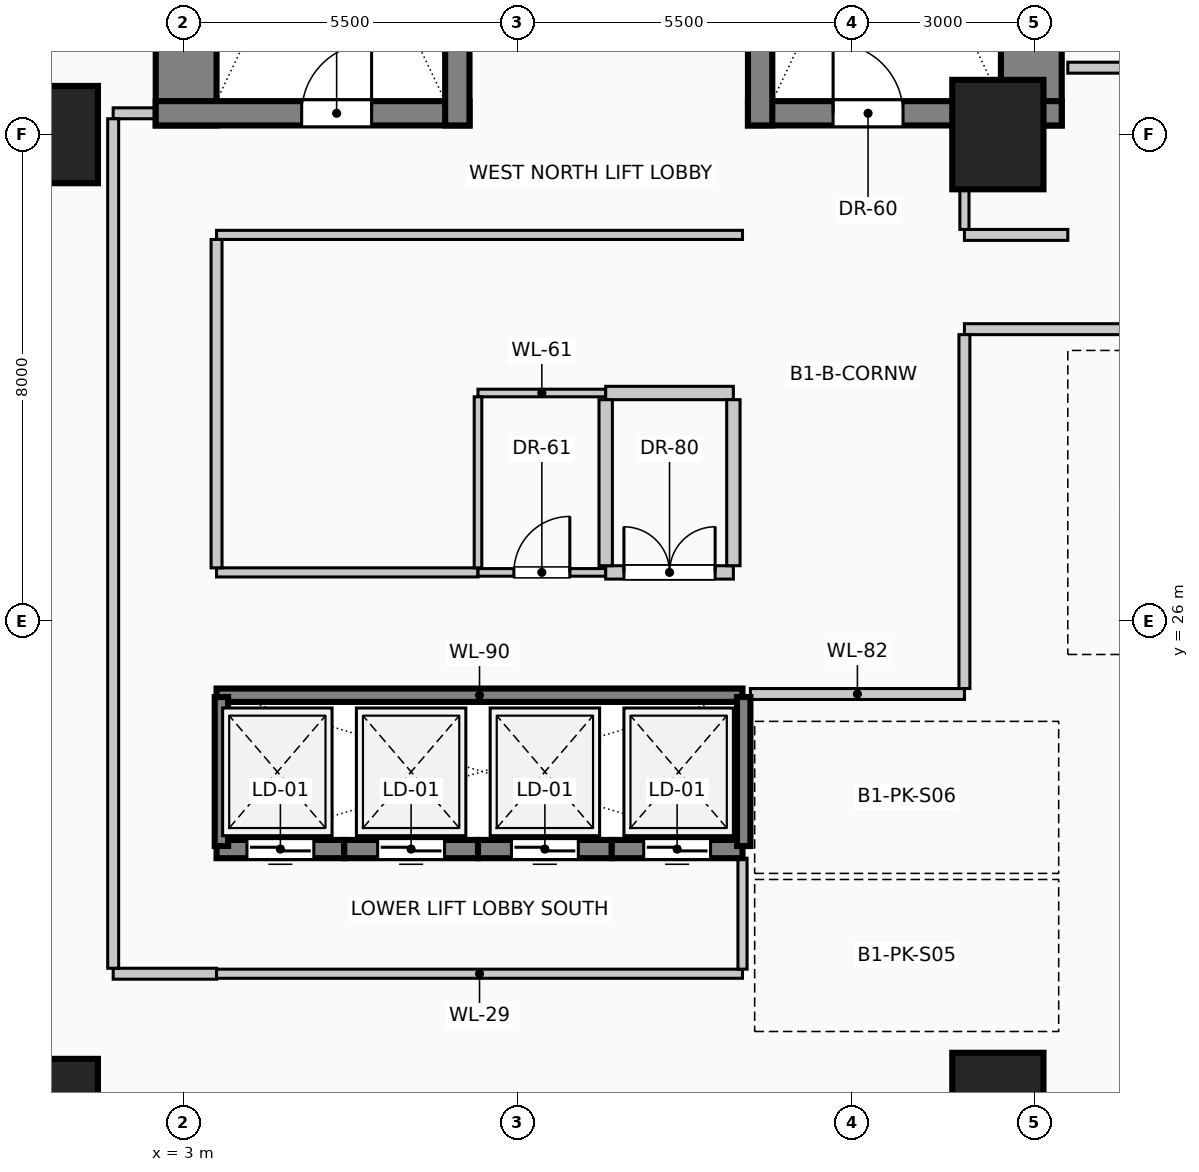
"""IFC4 building model, lengths in metres.
Left out: names, types, materials, properties, quantities, classifications, styles, units other than length and angle.
Written with IfcOpenShell. Run it as: python <this file> out.ifc"""

import sys

from ifc_helpers import new_model, si_unit, direction, frame, frame_2d, origin, origin_2d, place, context, subcontext, project, spatial, rectangle, extrude, element, fill, save


model = new_model("IFC4")
c1 = context("Model", 3, precision=1e-05, world=origin(), true_north=direction((0.0, 1.0)))
c2 = subcontext(c1, "Body", "Model", "MODEL_VIEW")
j1 = project(units=[si_unit("LENGTHUNIT", "METRE"), si_unit("PLANEANGLEUNIT", "RADIAN")], contexts=[c1])
p1 = place(None, origin())
s1 = spatial("IfcSite", under=j1, at=p1, CompositionType="ELEMENT")
p2 = place(p1, origin())
s2 = spatial("IfcBuilding", under=s1, at=p2, CompositionType="ELEMENT")
p3 = place(p2, frame((0.0, 0.0, -4.5)))
s3 = spatial("IfcBuildingStorey", under=s2, at=p3, CompositionType="ELEMENT", Elevation=-4.5)
for number, where, z_axis, x_axis in (
    (1, (3.05, 34.15, 0.0), (0.0, 0.0, 1.0), (0.0, 1.0, 0.0)),
    (2, (16.95, 34.15, 0.0), (0.0, 0.0, 1.0), (0.0, 1.0, 0.0)),
):
    element("IfcWall", number, at=place(p3, frame(where, z_axis=z_axis, x_axis=x_axis)), inside=s3, PredefinedType="SHEAR", context=c2, shape_type="SweptSolid", body=[
        extrude(rectangle(XDim=9.28, YDim=1.0, at=frame_2d((4.64, 0.0))), origin(), (0.0, 0.0, 1.0), 4.5),
    ])
p4 = place(p3, frame((2.55, 34.35, 0.0), z_axis=(0.0, 0.0, 1.0), x_axis=(1.0, 0.0, 0.0)))
e3 = element("IfcWall", 3, at=p4, inside=s3, PredefinedType="SHEAR", context=c2, shape_type="SweptSolid", body=[
    extrude(rectangle(XDim=5.16, YDim=0.4, at=frame_2d((2.58, 0.0))), origin(), (0.0, 0.0, 1.0), 4.5),
])
p5 = place(p4, frame((2.4, 0.0, 0.0)))
e4 = element("IfcOpeningElement", 4, at=p5, cuts=e3, PredefinedType="OPENING", context=c2, shape_type="SweptSolid", body=[
    extrude(rectangle(XDim=1.15, YDim=2.2, at=frame_2d((0.575, 1.1))), frame((0.0, 0.21, 0.0), z_axis=(0.0, -1.0, 0.0), x_axis=(1.0, 0.0, 0.0)), (0.0, 0.0, 1.0), 0.42),
])
p6 = place(p3, frame((12.29, 34.35, 0.0), z_axis=(0.0, 0.0, 1.0), x_axis=(1.0, 0.0, 0.0)))
e5 = element("IfcWall", 5, at=p6, inside=s3, PredefinedType="SHEAR", context=c2, shape_type="SweptSolid", body=[
    extrude(rectangle(XDim=5.16, YDim=0.4, at=frame_2d((2.58, 0.0))), origin(), (0.0, 0.0, 1.0), 4.5),
])
p7 = place(p6, frame((1.4, 0.0, 0.0)))
e6 = element("IfcOpeningElement", 6, at=p7, cuts=e5, PredefinedType="OPENING", context=c2, shape_type="SweptSolid", body=[
    extrude(rectangle(XDim=1.15, YDim=2.2, at=frame_2d((0.575, 1.1))), frame((0.0, 0.21, 0.0), z_axis=(0.0, -1.0, 0.0), x_axis=(1.0, 0.0, 0.0)), (0.0, 0.0, 1.0), 0.42),
])
for number, where, z_axis, x_axis in (
    (7, (7.51, 34.15, 0.0), (0.0, 0.0, 1.0), (0.0, 1.0, 0.0)),
    (8, (12.49, 34.15, 0.0), (0.0, 0.0, 1.0), (0.0, 1.0, 0.0)),
):
    element("IfcWall", number, at=place(p3, frame(where, z_axis=z_axis, x_axis=x_axis)), inside=s3, PredefinedType="SHEAR", context=c2, shape_type="SweptSolid", body=[
        extrude(rectangle(XDim=9.28, YDim=0.4, at=frame_2d((4.64, 0.0))), origin(), (0.0, 0.0, 1.0), 4.5),
    ])
for number, where, z_axis, x_axis in (
    (9, (0.6, 18.0, 0.0), (0.0, 0.0, 1.0), (0.0, 1.0, 0.0)),
    (10, (0.6, 34.0, 0.0), (0.0, 0.0, 1.0), (0.0, 1.0, 0.0)),
):
    element("IfcColumn", number, at=place(p3, frame(where, z_axis=z_axis, x_axis=x_axis)), inside=s3, PredefinedType="COLUMN", context=c2, shape_type="SweptSolid", body=[
        extrude(rectangle(XDim=1.6, YDim=2.0, at=origin_2d()), origin(), (0.0, 0.0, 1.0), 4.5),
    ])
for number, where, z_axis, x_axis in (
    (11, (16.4, 18.0, 0.0), (0.0, 0.0, 1.0), (1.0, 0.0, 0.0)),
    (12, (16.4, 34.0, 0.0), (0.0, 0.0, 1.0), (1.0, 0.0, 0.0)),
):
    element("IfcColumn", number, at=place(p3, frame(where, z_axis=z_axis, x_axis=x_axis)), inside=s3, PredefinedType="COLUMN", context=c2, shape_type="SweptSolid", body=[
        extrude(rectangle(XDim=1.5, YDim=1.8, at=origin_2d()), origin(), (0.0, 0.0, 1.0), 4.5),
    ])
p8 = place(p3, frame((5.65, 22.25, 0.0), z_axis=(0.0, 0.0, 1.0), x_axis=(-1.0, 0.0, 0.0)))
e13 = element("IfcWall", 13, at=p8, inside=s3, PredefinedType="SOLIDWALL", context=c2, shape_type="SweptSolid", body=[
    extrude(rectangle(XDim=2.1, YDim=0.3, at=frame_2d((1.05, 0.0))), origin(), (0.0, 0.0, 1.0), 4.5),
])
p9 = place(p8, frame((0.5, 0.0, 0.0)))
e14 = element("IfcOpeningElement", 14, at=p9, cuts=e13, PredefinedType="OPENING", context=c2, shape_type="SweptSolid", body=[
    extrude(rectangle(XDim=1.1, YDim=2.2, at=frame_2d((0.55, 1.1))), frame((0.0, 0.16, 0.0), z_axis=(0.0, -1.0, 0.0), x_axis=(1.0, 0.0, 0.0)), (0.0, 0.0, 1.0), 0.32),
])
p10 = place(p3, frame((7.85, 22.25, 0.0), z_axis=(0.0, 0.0, 1.0), x_axis=(-1.0, 0.0, 0.0)))
e15 = element("IfcWall", 15, at=p10, inside=s3, PredefinedType="SOLIDWALL", context=c2, shape_type="SweptSolid", body=[
    extrude(rectangle(XDim=2.2, YDim=0.3, at=frame_2d((1.1, 0.0))), origin(), (0.0, 0.0, 1.0), 4.5),
])
p11 = place(p10, frame((0.55, 0.0, 0.0)))
e16 = element("IfcOpeningElement", 16, at=p11, cuts=e15, PredefinedType="OPENING", context=c2, shape_type="SweptSolid", body=[
    extrude(rectangle(XDim=1.1, YDim=2.2, at=frame_2d((0.55, 1.1))), frame((0.0, 0.16, 0.0), z_axis=(0.0, -1.0, 0.0), x_axis=(1.0, 0.0, 0.0)), (0.0, 0.0, 1.0), 0.32),
])
p12 = place(p3, frame((10.05, 22.25, 0.0), z_axis=(0.0, 0.0, 1.0), x_axis=(-1.0, 0.0, 0.0)))
e17 = element("IfcWall", 17, at=p12, inside=s3, PredefinedType="SOLIDWALL", context=c2, shape_type="SweptSolid", body=[
    extrude(rectangle(XDim=2.2, YDim=0.3, at=frame_2d((1.1, 0.0))), origin(), (0.0, 0.0, 1.0), 4.5),
])
p13 = place(p12, frame((0.55, 0.0, 0.0)))
e18 = element("IfcOpeningElement", 18, at=p13, cuts=e17, PredefinedType="OPENING", context=c2, shape_type="SweptSolid", body=[
    extrude(rectangle(XDim=1.1, YDim=2.2, at=frame_2d((0.55, 1.1))), frame((0.0, 0.16, 0.0), z_axis=(0.0, -1.0, 0.0), x_axis=(1.0, 0.0, 0.0)), (0.0, 0.0, 1.0), 0.32),
])
p14 = place(p3, frame((12.2, 22.25, 0.0), z_axis=(0.0, 0.0, 1.0), x_axis=(-1.0, 0.0, 0.0)))
e19 = element("IfcWall", 19, at=p14, inside=s3, PredefinedType="SOLIDWALL", context=c2, shape_type="SweptSolid", body=[
    extrude(rectangle(XDim=2.15, YDim=0.3, at=frame_2d((1.075, 0.0))), origin(), (0.0, 0.0, 1.0), 4.5),
])
p15 = place(p14, frame((0.525, 0.0, 0.0)))
e20 = element("IfcOpeningElement", 20, at=p15, cuts=e19, PredefinedType="OPENING", context=c2, shape_type="SweptSolid", body=[
    extrude(rectangle(XDim=1.1, YDim=2.2, at=frame_2d((0.55, 1.1))), frame((0.0, 0.16, 0.0), z_axis=(0.0, -1.0, 0.0), x_axis=(1.0, 0.0, 0.0)), (0.0, 0.0, 1.0), 0.32),
])
p16 = place(p3, frame((3.55, 24.78, 0.0), z_axis=(0.0, 0.0, 1.0), x_axis=(1.0, 0.0, 0.0)))
e21 = element("IfcWall", 21, at=p16, inside=s3, PredefinedType="SOLIDWALL", context=c2, shape_type="SweptSolid", body=[
    extrude(rectangle(XDim=8.65, YDim=0.22, at=frame_2d((4.325, 0.0))), origin(), (0.0, 0.0, 1.0), 4.5),
])
for number, where, z_axis, x_axis in (
    (22, (3.63, 22.3, 0.0), (0.0, 0.0, 1.0), (0.0, 1.0, 0.0)),
    (23, (12.22, 22.3, 0.0), (0.0, 0.0, 1.0), (0.0, 1.0, 0.0)),
):
    element("IfcWall", number, at=place(p3, frame(where, z_axis=z_axis, x_axis=x_axis)), inside=s3, PredefinedType="SOLIDWALL", context=c2, shape_type="SweptSolid", body=[
        extrude(rectangle(XDim=2.45, YDim=0.22, at=frame_2d((1.225, 0.0))), origin(), (0.0, 0.0, 1.0), 4.5),
    ])
p17 = place(p3, frame((1.85, 20.2, 0.0), z_axis=(0.0, 0.0, 1.0), x_axis=(1.0, 0.0, 0.0)))
e24 = element("IfcWall", 24, at=p17, inside=s3, PredefinedType="PARTITIONING", context=c2, shape_type="SweptSolid", body=[
    extrude(rectangle(XDim=1.7, YDim=0.18, at=frame_2d((0.85, 0.0))), origin(), (0.0, 0.0, 1.0), 4.1),
])
p18 = place(p3, frame((3.55, 20.2, 0.0), z_axis=(0.0, 0.0, 1.0), x_axis=(1.0, 0.0, 0.0)))
e25 = element("IfcWall", 25, at=p18, inside=s3, PredefinedType="PARTITIONING", context=c2, shape_type="SweptSolid", body=[
    extrude(rectangle(XDim=8.65, YDim=0.15, at=frame_2d((4.325, 0.0))), origin(), (0.0, 0.0, 1.0), 4.1),
])
p19 = place(p3, frame((12.33, 24.8, 0.0), z_axis=(0.0, 0.0, 1.0), x_axis=(1.0, 0.0, 0.0)))
e26 = element("IfcWall", 26, at=p19, inside=s3, PredefinedType="PARTITIONING", context=c2, shape_type="SweptSolid", body=[
    extrude(rectangle(XDim=3.52, YDim=0.18, at=frame_2d((1.76, 0.0))), origin(), (0.0, 0.0, 1.0), 4.1),
])
p20 = place(p3, frame((3.55, 26.8, 0.0), z_axis=(0.0, 0.0, 1.0), x_axis=(1.0, 0.0, 0.0)))
e27 = element("IfcWall", 27, at=p20, inside=s3, PredefinedType="PARTITIONING", context=c2, shape_type="SweptSolid", body=[
    extrude(rectangle(XDim=4.3, YDim=0.15, at=frame_2d((2.15, 0.0))), origin(), (0.0, 0.0, 1.0), 4.1),
])
p21 = place(p3, frame((7.85, 26.8, 0.0), z_axis=(0.0, 0.0, 1.0), x_axis=(1.0, 0.0, 0.0)))
e28 = element("IfcWall", 28, at=p21, inside=s3, PredefinedType="PARTITIONING", context=c2, shape_type="SweptSolid", body=[
    extrude(rectangle(XDim=2.1, YDim=0.125, at=frame_2d((1.05, 0.0))), origin(), (0.0, 0.0, 1.0), 4.1),
])
p22 = place(p21, frame((0.59, 0.0, 0.0)))
e29 = element("IfcOpeningElement", 29, at=p22, cuts=e28, PredefinedType="OPENING", context=c2, shape_type="SweptSolid", body=[
    extrude(rectangle(XDim=0.92, YDim=2.1, at=frame_2d((0.46, 1.05))), frame((0.0, 0.073, 0.0), z_axis=(0.0, -1.0, 0.0), x_axis=(1.0, 0.0, 0.0)), (0.0, 0.0, 1.0), 0.145),
])
p23 = place(p3, frame((9.95, 26.8, 0.0), z_axis=(0.0, 0.0, 1.0), x_axis=(1.0, 0.0, 0.0)))
e30 = element("IfcWall", 30, at=p23, inside=s3, PredefinedType="PARTITIONING", context=c2, shape_type="SweptSolid", body=[
    extrude(rectangle(XDim=2.1, YDim=0.22, at=frame_2d((1.05, 0.0))), origin(), (0.0, 0.0, 1.0), 4.1),
])
p24 = place(p23, frame((0.3, 0.0, 0.0)))
e31 = element("IfcOpeningElement", 31, at=p24, cuts=e30, PredefinedType="OPENING", context=c2, shape_type="SweptSolid", body=[
    extrude(rectangle(XDim=1.5, YDim=2.25, at=frame_2d((0.75, 1.125))), frame((0.0, 0.12, 0.0), z_axis=(0.0, -1.0, 0.0), x_axis=(1.0, 0.0, 0.0)), (0.0, 0.0, 1.0), 0.24),
])
p25 = place(p3, frame((7.85, 29.75, 0.0), z_axis=(0.0, 0.0, 1.0), x_axis=(1.0, 0.0, 0.0)))
e32 = element("IfcWall", 32, at=p25, inside=s3, PredefinedType="PARTITIONING", context=c2, shape_type="SweptSolid", body=[
    extrude(rectangle(XDim=2.1, YDim=0.125, at=frame_2d((1.05, 0.0))), origin(), (0.0, 0.0, 1.0), 4.1),
])
p26 = place(p3, frame((9.95, 29.75, 0.0), z_axis=(0.0, 0.0, 1.0), x_axis=(1.0, 0.0, 0.0)))
e33 = element("IfcWall", 33, at=p26, inside=s3, PredefinedType="PARTITIONING", context=c2, shape_type="SweptSolid", body=[
    extrude(rectangle(XDim=2.1, YDim=0.22, at=frame_2d((1.05, 0.0))), origin(), (0.0, 0.0, 1.0), 4.1),
])
p27 = place(p3, frame((15.85, 30.8, 0.0), z_axis=(0.0, 0.0, 1.0), x_axis=(1.0, 0.0, 0.0)))
e34 = element("IfcWall", 34, at=p27, inside=s3, PredefinedType="PARTITIONING", context=c2, shape_type="SweptSolid", body=[
    extrude(rectangle(XDim=29.7, YDim=0.18, at=frame_2d((14.85, 0.0))), origin(), (0.0, 0.0, 1.0), 4.1),
])
p28 = place(p3, frame((3.55, 32.35, 0.0), z_axis=(0.0, 0.0, 1.0), x_axis=(1.0, 0.0, 0.0)))
e35 = element("IfcWall", 35, at=p28, inside=s3, PredefinedType="PARTITIONING", context=c2, shape_type="SweptSolid", body=[
    extrude(rectangle(XDim=8.65, YDim=0.15, at=frame_2d((4.325, 0.0))), origin(), (0.0, 0.0, 1.0), 4.1),
])
p29 = place(p3, frame((15.85, 32.35, 0.0), z_axis=(0.0, 0.0, 1.0), x_axis=(1.0, 0.0, 0.0)))
e36 = element("IfcWall", 36, at=p29, inside=s3, PredefinedType="PARTITIONING", context=c2, shape_type="SweptSolid", body=[
    extrude(rectangle(XDim=1.7, YDim=0.18, at=frame_2d((0.85, 0.0))), origin(), (0.0, 0.0, 1.0), 4.1),
])
p30 = place(p3, frame((1.85, 34.35, 0.0), z_axis=(0.0, 0.0, 1.0), x_axis=(1.0, 0.0, 0.0)))
e37 = element("IfcWall", 37, at=p30, inside=s3, PredefinedType="PARTITIONING", context=c2, shape_type="SweptSolid", body=[
    extrude(rectangle(XDim=0.7, YDim=0.18, at=frame_2d((0.35, 0.0))), origin(), (0.0, 0.0, 1.0), 3.145),
])
p31 = place(p3, frame((17.55, 35.1, 0.0), z_axis=(0.0, 0.0, 1.0), x_axis=(1.0, 0.0, 0.0)))
e38 = element("IfcWall", 38, at=p31, inside=s3, PredefinedType="PARTITIONING", context=c2, shape_type="SweptSolid", body=[
    extrude(rectangle(XDim=10.25, YDim=0.18, at=frame_2d((5.125, 0.0))), origin(), (0.0, 0.0, 1.0), 4.1),
])
p32 = place(p31, frame((4.685, 0.0, 0.0)))
e39 = element("IfcOpeningElement", 39, at=p32, cuts=e38, PredefinedType="OPENING", context=c2, shape_type="SweptSolid", body=[
    extrude(rectangle(XDim=0.88, YDim=2.1, at=frame_2d((0.44, 1.05))), frame((0.0, 0.1, 0.0), z_axis=(0.0, -1.0, 0.0), x_axis=(1.0, 0.0, 0.0)), (0.0, 0.0, 1.0), 0.2),
])
p33 = place(p3, frame((1.85, 20.29, 0.0), z_axis=(0.0, 0.0, 1.0), x_axis=(0.0, 1.0, 0.0)))
e40 = element("IfcWall", 40, at=p33, inside=s3, PredefinedType="PARTITIONING", context=c2, shape_type="SweptSolid", body=[
    extrude(rectangle(XDim=13.97, YDim=0.18, at=frame_2d((6.985, 0.0))), origin(), (0.0, 0.0, 1.0), 4.1),
])
p34 = place(p3, frame((3.55, 26.875, 0.0), z_axis=(0.0, 0.0, 1.0), x_axis=(0.0, 1.0, 0.0)))
e41 = element("IfcWall", 41, at=p34, inside=s3, PredefinedType="PARTITIONING", context=c2, shape_type="SweptSolid", body=[
    extrude(rectangle(XDim=5.4, YDim=0.18, at=frame_2d((2.7, 0.0))), origin(), (0.0, 0.0, 1.0), 4.1),
])
p35 = place(p3, frame((7.85, 26.875, 0.0), z_axis=(0.0, 0.0, 1.0), x_axis=(0.0, 1.0, 0.0)))
e42 = element("IfcWall", 42, at=p35, inside=s3, PredefinedType="PARTITIONING", context=c2, shape_type="SweptSolid", body=[
    extrude(rectangle(XDim=2.812, YDim=0.125, at=frame_2d((1.406, 0.0))), origin(), (0.0, 0.0, 1.0), 4.1),
])
for number, where, z_axis, x_axis in (
    (43, (9.95, 26.91, 0.0), (0.0, 0.0, 1.0), (0.0, 1.0, 0.0)),
    (44, (12.05, 26.91, 0.0), (0.0, 0.0, 1.0), (0.0, 1.0, 0.0)),
):
    element("IfcWall", number, at=place(p3, frame(where, z_axis=z_axis, x_axis=x_axis)), inside=s3, PredefinedType="PARTITIONING", context=c2, shape_type="SweptSolid", body=[
        extrude(rectangle(XDim=2.73, YDim=0.22, at=frame_2d((1.365, 0.0))), origin(), (0.0, 0.0, 1.0), 4.1),
    ])
p36 = place(p3, frame((12.2, 20.275, 0.0), z_axis=(0.0, 0.0, 1.0), x_axis=(0.0, 1.0, 0.0)))
e45 = element("IfcWall", 45, at=p36, inside=s3, PredefinedType="PARTITIONING", context=c2, shape_type="SweptSolid", body=[
    extrude(rectangle(XDim=1.825, YDim=0.15, at=frame_2d((0.913, 0.0))), origin(), (0.0, 0.0, 1.0), 4.1),
])
p37 = place(p3, frame((15.85, 24.89, 0.0), z_axis=(0.0, 0.0, 1.0), x_axis=(0.0, 1.0, 0.0)))
e46 = element("IfcWall", 46, at=p37, inside=s3, PredefinedType="PARTITIONING", context=c2, shape_type="SweptSolid", body=[
    extrude(rectangle(XDim=5.82, YDim=0.18, at=frame_2d((2.91, 0.0))), origin(), (0.0, 0.0, 1.0), 4.1),
])
p38 = place(p3, frame((15.85, 32.44, 0.0), z_axis=(0.0, 0.0, 1.0), x_axis=(0.0, 1.0, 0.0)))
e47 = element("IfcWall", 47, at=p38, inside=s3, PredefinedType="PARTITIONING", context=c2, shape_type="SweptSolid", body=[
    extrude(rectangle(XDim=0.66, YDim=0.15, at=frame_2d((0.33, 0.0))), origin(), (0.0, 0.0, 1.0), 4.1),
])
p39 = place(p9, origin())
e48 = element("IfcDoor", 48, at=p39, inside=s3, OperationType="SLIDING_TO_LEFT", PredefinedType="DOOR", context=c2, shape_type="SweptSolid", body=[
    extrude(rectangle(XDim=1.1, YDim=2.2, at=frame_2d((0.55, 1.1))), frame((0.0, 0.025, 0.0), z_axis=(0.0, -1.0, 0.0), x_axis=(1.0, 0.0, 0.0)), (0.0, 0.0, 1.0), 0.05),
])
fill(e14, e48)
p40 = place(p11, origin())
e49 = element("IfcDoor", 49, at=p40, inside=s3, OperationType="SLIDING_TO_RIGHT", PredefinedType="DOOR", context=c2, shape_type="SweptSolid", body=[
    extrude(rectangle(XDim=1.1, YDim=2.2, at=frame_2d((0.55, 1.1))), frame((0.0, 0.025, 0.0), z_axis=(0.0, -1.0, 0.0), x_axis=(1.0, 0.0, 0.0)), (0.0, 0.0, 1.0), 0.05),
])
fill(e16, e49)
p41 = place(p13, origin())
e50 = element("IfcDoor", 50, at=p41, inside=s3, OperationType="SLIDING_TO_LEFT", PredefinedType="DOOR", context=c2, shape_type="SweptSolid", body=[
    extrude(rectangle(XDim=1.1, YDim=2.2, at=frame_2d((0.55, 1.1))), frame((0.0, 0.025, 0.0), z_axis=(0.0, -1.0, 0.0), x_axis=(1.0, 0.0, 0.0)), (0.0, 0.0, 1.0), 0.05),
])
fill(e18, e50)
p42 = place(p15, origin())
e51 = element("IfcDoor", 51, at=p42, inside=s3, OperationType="SLIDING_TO_RIGHT", PredefinedType="DOOR", context=c2, shape_type="SweptSolid", body=[
    extrude(rectangle(XDim=1.1, YDim=2.2, at=frame_2d((0.55, 1.1))), frame((0.0, 0.025, 0.0), z_axis=(0.0, -1.0, 0.0), x_axis=(1.0, 0.0, 0.0)), (0.0, 0.0, 1.0), 0.05),
])
fill(e20, e51)
p43 = place(p5, origin())
e52 = element("IfcDoor", 52, at=p43, inside=s3, OperationType="SINGLE_SWING_RIGHT", PredefinedType="DOOR", context=c2, shape_type="SweptSolid", body=[
    extrude(rectangle(XDim=1.15, YDim=2.2, at=frame_2d((0.575, 1.1))), frame((0.0, 0.025, 0.0), z_axis=(0.0, -1.0, 0.0), x_axis=(1.0, 0.0, 0.0)), (0.0, 0.0, 1.0), 0.05),
])
fill(e4, e52)
p44 = place(p7, origin())
e53 = element("IfcDoor", 53, at=p44, inside=s3, OperationType="SINGLE_SWING_LEFT", PredefinedType="DOOR", context=c2, shape_type="SweptSolid", body=[
    extrude(rectangle(XDim=1.15, YDim=2.2, at=frame_2d((0.575, 1.1))), frame((0.0, 0.025, 0.0), z_axis=(0.0, -1.0, 0.0), x_axis=(1.0, 0.0, 0.0)), (0.0, 0.0, 1.0), 0.05),
])
fill(e6, e53)
p45 = place(p22, origin())
e54 = element("IfcDoor", 54, at=p45, inside=s3, OperationType="SINGLE_SWING_RIGHT", PredefinedType="DOOR", context=c2, shape_type="SweptSolid", body=[
    extrude(rectangle(XDim=0.92, YDim=2.1, at=frame_2d((0.46, 1.05))), frame((0.0, 0.025, 0.0), z_axis=(0.0, -1.0, 0.0), x_axis=(1.0, 0.0, 0.0)), (0.0, 0.0, 1.0), 0.05),
])
fill(e29, e54)
p46 = place(p24, origin())
e55 = element("IfcDoor", 55, at=p46, inside=s3, OperationType="DOUBLE_DOOR_SINGLE_SWING", PredefinedType="DOOR", context=c2, shape_type="SweptSolid", body=[
    extrude(rectangle(XDim=1.5, YDim=2.25, at=frame_2d((0.75, 1.125))), frame((0.0, 0.025, 0.0), z_axis=(0.0, -1.0, 0.0), x_axis=(1.0, 0.0, 0.0)), (0.0, 0.0, 1.0), 0.05),
])
fill(e31, e55)
save(model, sys.argv[1])
